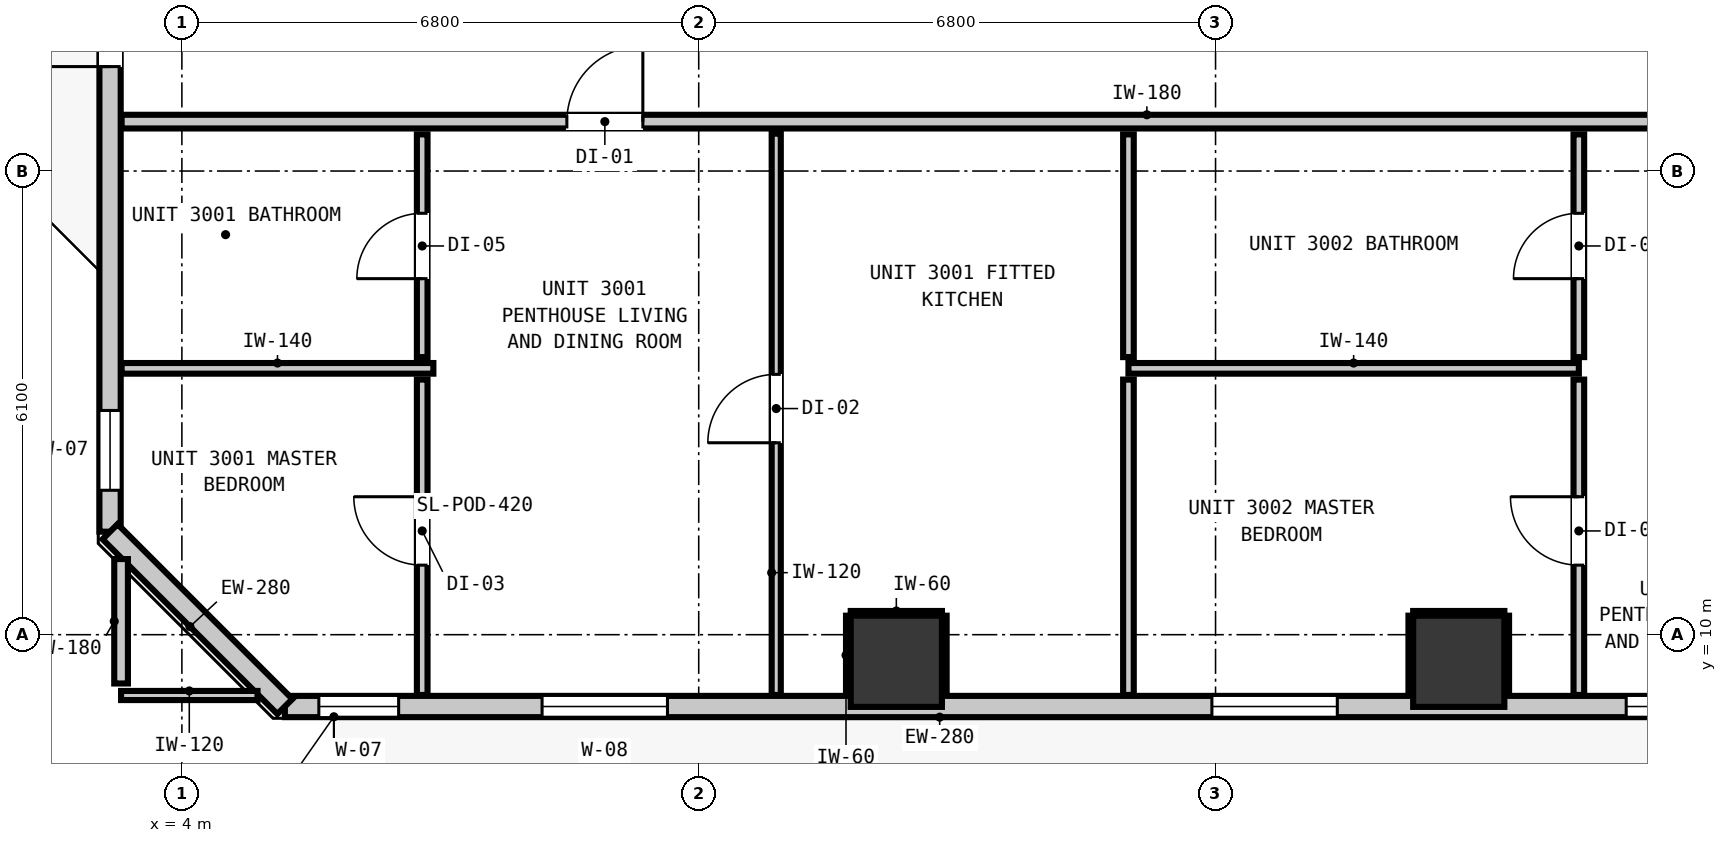
"""IFC4 building model, lengths in metres.
Left out: names, types, materials, properties, quantities, classifications, styles, units other than length and angle.
Written with IfcOpenShell. Run it as: python <this file> out.ifc"""

import sys

from ifc_helpers import new_model, si_unit, direction, frame, frame_2d, origin, origin_2d, place, context, subcontext, project, spatial, rectangle, extrude, element, fill, save


model = new_model("IFC4")
c1 = context("Model", 3, precision=1e-05, world=origin(), true_north=direction((0.0, 1.0)))
c2 = subcontext(c1, "Body", "Model", "MODEL_VIEW")
j1 = project(units=[si_unit("LENGTHUNIT", "METRE"), si_unit("PLANEANGLEUNIT", "RADIAN")], contexts=[c1])
p1 = place(None, origin())
s1 = spatial("IfcSite", under=j1, at=p1, CompositionType="ELEMENT")
p2 = place(p1, origin())
s2 = spatial("IfcBuilding", under=s1, at=p2, CompositionType="ELEMENT")
p3 = place(p2, frame((0.0, 0.0, 106.08)))
s3 = spatial("IfcBuildingStorey", under=s2, at=p3, CompositionType="ELEMENT", Elevation=106.08)
for number, where, z_axis, x_axis in (
    (1, (13.4, 9.65, -0.2), (0.0, 0.0, 1.0), (1.0, 0.0, 0.0)),
    (2, (20.8, 9.65, -0.2), (0.0, 0.0, 1.0), (1.0, 0.0, 0.0)),
):
    element("IfcColumn", number, at=place(p3, frame(where, z_axis=z_axis, x_axis=x_axis)), inside=s3, PredefinedType="COLUMN", context=c2, shape_type="SweptSolid", body=[
        extrude(rectangle(XDim=1.2, YDim=1.2, at=origin_2d()), origin(), (0.0, 0.0, 1.0), 3.52),
    ])
p4 = place(p3, frame((3.055, 11.355, 0.0), z_axis=(0.0, 0.0, 1.0), x_axis=(0.0, 1.0, 0.0)))
e3 = element("IfcWall", 3, at=p4, inside=s3, PredefinedType="STANDARD", context=c2, shape_type="SweptSolid", body=[
    extrude(rectangle(XDim=32.29, YDim=0.28, at=frame_2d((16.145, 0.0))), origin(), (0.0, 0.0, 1.0), 3.08),
])
p5 = place(p4, frame((6.119, 0.0, 0.0)))
e4 = element("IfcOpeningElement", 4, at=p5, cuts=e3, PredefinedType="OPENING", context=c2, shape_type="SweptSolid", body=[
    extrude(rectangle(XDim=1.1, YDim=2.15, at=frame_2d((0.55, 1.075))), frame((0.0, 0.15, 0.0), z_axis=(0.0, -1.0, 0.0), x_axis=(1.0, 0.0, 0.0)), (0.0, 0.0, 1.0), 0.3),
])
p6 = place(p4, frame((0.545, 0.0, 0.85)))
e5 = element("IfcOpeningElement", 5, at=p6, cuts=e3, PredefinedType="OPENING", context=c2, shape_type="SweptSolid", body=[
    extrude(rectangle(XDim=1.05, YDim=1.65, at=frame_2d((0.525, 0.825))), frame((0.0, 0.15, 0.0), z_axis=(0.0, -1.0, 0.0), x_axis=(1.0, 0.0, 0.0)), (0.0, 0.0, 1.0), 0.3),
])
p7 = place(p4, frame((13.649, 0.0, 0.85)))
e6 = element("IfcOpeningElement", 6, at=p7, cuts=e3, PredefinedType="OPENING", context=c2, shape_type="SweptSolid", body=[
    extrude(rectangle(XDim=1.65, YDim=1.75, at=frame_2d((0.825, 0.875))), frame((0.0, 0.15, 0.0), z_axis=(0.0, -1.0, 0.0), x_axis=(1.0, 0.0, 0.0)), (0.0, 0.0, 1.0), 0.3),
])
p8 = place(p4, frame((16.887, 0.0, 0.85)))
e7 = element("IfcOpeningElement", 7, at=p8, cuts=e3, PredefinedType="OPENING", context=c2, shape_type="SweptSolid", body=[
    extrude(rectangle(XDim=1.65, YDim=1.75, at=frame_2d((0.825, 0.875))), frame((0.0, 0.15, 0.0), z_axis=(0.0, -1.0, 0.0), x_axis=(1.0, 0.0, 0.0)), (0.0, 0.0, 1.0), 0.3),
])
p9 = place(p4, frame((23.2, 0.0, 0.85)))
e8 = element("IfcOpeningElement", 8, at=p9, cuts=e3, PredefinedType="OPENING", context=c2, shape_type="SweptSolid", body=[
    extrude(rectangle(XDim=1.65, YDim=1.75, at=frame_2d((0.825, 0.875))), frame((0.0, 0.15, 0.0), z_axis=(0.0, -1.0, 0.0), x_axis=(1.0, 0.0, 0.0)), (0.0, 0.0, 1.0), 0.3),
])
p10 = place(p4, frame((26.312, 0.0, 0.85)))
e9 = element("IfcOpeningElement", 9, at=p10, cuts=e3, PredefinedType="OPENING", context=c2, shape_type="SweptSolid", body=[
    extrude(rectangle(XDim=1.05, YDim=1.65, at=frame_2d((0.525, 0.825))), frame((0.0, 0.15, 0.0), z_axis=(0.0, -1.0, 0.0), x_axis=(1.0, 0.0, 0.0)), (0.0, 0.0, 1.0), 0.3),
])
p11 = place(p3, frame((40.445, 9.055, 0.0), z_axis=(0.0, 0.0, 1.0), x_axis=(-1.0, 0.0, 0.0)))
e10 = element("IfcWall", 10, at=p11, inside=s3, PredefinedType="STANDARD", context=c2, shape_type="SweptSolid", body=[
    extrude(rectangle(XDim=35.09, YDim=0.28, at=frame_2d((17.545, 0.0))), origin(), (0.0, 0.0, 1.0), 3.08),
])
p12 = place(p11, frame((5.114, 0.0, 0.0)))
e11 = element("IfcOpeningElement", 11, at=p12, cuts=e10, PredefinedType="OPENING", context=c2, shape_type="SweptSolid", body=[
    extrude(rectangle(XDim=1.0, YDim=2.15, at=frame_2d((0.5, 1.075))), frame((0.0, 0.15, 0.0), z_axis=(0.0, -1.0, 0.0), x_axis=(1.0, 0.0, 0.0)), (0.0, 0.0, 1.0), 0.3),
])
p13 = place(p11, frame((30.056, 0.0, 0.85)))
e12 = element("IfcOpeningElement", 12, at=p13, cuts=e10, PredefinedType="OPENING", context=c2, shape_type="SweptSolid", body=[
    extrude(rectangle(XDim=1.65, YDim=1.75, at=frame_2d((0.825, 0.875))), frame((0.0, 0.15, 0.0), z_axis=(0.0, -1.0, 0.0), x_axis=(1.0, 0.0, 0.0)), (0.0, 0.0, 1.0), 0.3),
])
p14 = place(p11, frame((33.593, 0.0, 0.85)))
e13 = element("IfcOpeningElement", 13, at=p14, cuts=e10, PredefinedType="OPENING", context=c2, shape_type="SweptSolid", body=[
    extrude(rectangle(XDim=1.05, YDim=1.65, at=frame_2d((0.525, 0.825))), frame((0.0, 0.15, 0.0), z_axis=(0.0, -1.0, 0.0), x_axis=(1.0, 0.0, 0.0)), (0.0, 0.0, 1.0), 0.3),
])
p15 = place(p11, frame((15.792, 0.0, 0.85)))
e14 = element("IfcOpeningElement", 14, at=p15, cuts=e10, PredefinedType="OPENING", context=c2, shape_type="SweptSolid", body=[
    extrude(rectangle(XDim=1.65, YDim=1.75, at=frame_2d((0.825, 0.875))), frame((0.0, 0.15, 0.0), z_axis=(0.0, -1.0, 0.0), x_axis=(1.0, 0.0, 0.0)), (0.0, 0.0, 1.0), 0.3),
])
p16 = place(p11, frame((21.243, 0.0, 0.85)))
e15 = element("IfcOpeningElement", 15, at=p16, cuts=e10, PredefinedType="OPENING", context=c2, shape_type="SweptSolid", body=[
    extrude(rectangle(XDim=1.65, YDim=1.75, at=frame_2d((0.825, 0.875))), frame((0.0, 0.15, 0.0), z_axis=(0.0, -1.0, 0.0), x_axis=(1.0, 0.0, 0.0)), (0.0, 0.0, 1.0), 0.3),
])
p17 = place(p11, frame((6.707, 0.0, 0.85)))
e16 = element("IfcOpeningElement", 16, at=p17, cuts=e10, PredefinedType="OPENING", context=c2, shape_type="SweptSolid", body=[
    extrude(rectangle(XDim=1.05, YDim=1.65, at=frame_2d((0.525, 0.825))), frame((0.0, 0.15, 0.0), z_axis=(0.0, -1.0, 0.0), x_axis=(1.0, 0.0, 0.0)), (0.0, 0.0, 1.0), 0.3),
])
p18 = place(p11, frame((8.673, 0.0, 0.85)))
e17 = element("IfcOpeningElement", 17, at=p18, cuts=e10, PredefinedType="OPENING", context=c2, shape_type="SweptSolid", body=[
    extrude(rectangle(XDim=1.65, YDim=1.75, at=frame_2d((0.825, 0.875))), frame((0.0, 0.15, 0.0), z_axis=(0.0, -1.0, 0.0), x_axis=(1.0, 0.0, 0.0)), (0.0, 0.0, 1.0), 0.3),
])
p19 = place(p3, frame((5.355, 9.055, 0.0), z_axis=(0.0, 0.0, 1.0), x_axis=(-0.707106781187, 0.707106781187, 0.0)))
e18 = element("IfcWall", 18, at=p19, inside=s3, PredefinedType="STANDARD", context=c2, shape_type="SweptSolid", body=[
    extrude(rectangle(XDim=3.253, YDim=0.28, at=frame_2d((1.626, 0.0))), origin(), (0.0, 0.0, 1.0), 3.08),
])
p20 = place(p3, frame((3.207, 16.75, 0.0), z_axis=(0.0, 0.0, 1.0), x_axis=(1.0, 0.0, 0.0)))
e19 = element("IfcWall", 19, at=p20, inside=s3, PredefinedType="PARTITIONING", context=c2, shape_type="SweptSolid", body=[
    extrude(rectangle(XDim=39.386, YDim=0.18, at=frame_2d((19.693, 0.0))), origin(), (0.0, 0.0, 1.0), 3.08),
])
p21 = place(p20, frame((5.858, 0.0, 0.0)))
e20 = element("IfcOpeningElement", 20, at=p21, cuts=e19, PredefinedType="OPENING", context=c2, shape_type="SweptSolid", body=[
    extrude(rectangle(XDim=1.0, YDim=2.15, at=frame_2d((0.5, 1.075))), frame((0.0, 0.1, 0.0), z_axis=(0.0, -1.0, 0.0), x_axis=(1.0, 0.0, 0.0)), (0.0, 0.0, 1.0), 0.2),
])
p22 = place(p20, frame((20.121, 0.0, 0.0)))
e21 = element("IfcOpeningElement", 21, at=p22, cuts=e19, PredefinedType="OPENING", context=c2, shape_type="SweptSolid", body=[
    extrude(rectangle(XDim=1.0, YDim=2.15, at=frame_2d((0.5, 1.075))), frame((0.0, 0.1, 0.0), z_axis=(0.0, -1.0, 0.0), x_axis=(1.0, 0.0, 0.0)), (0.0, 0.0, 1.0), 0.2),
])
p23 = place(p20, frame((31.654, 0.0, 0.0)))
e22 = element("IfcOpeningElement", 22, at=p23, cuts=e19, PredefinedType="OPENING", context=c2, shape_type="SweptSolid", body=[
    extrude(rectangle(XDim=1.0, YDim=2.15, at=frame_2d((0.5, 1.075))), frame((0.0, 0.1, 0.0), z_axis=(0.0, -1.0, 0.0), x_axis=(1.0, 0.0, 0.0)), (0.0, 0.0, 1.0), 0.2),
])
p24 = place(p3, frame((3.207, 13.504, 0.0), z_axis=(0.0, 0.0, 1.0), x_axis=(1.0, 0.0, 0.0)))
e23 = element("IfcWall", 23, at=p24, inside=s3, PredefinedType="PARTITIONING", context=c2, shape_type="SweptSolid", body=[
    extrude(rectangle(XDim=4.102, YDim=0.14, at=frame_2d((2.051, 0.0))), origin(), (0.0, 0.0, 1.0), 3.08),
])
p25 = place(p3, frame((16.454, 13.504, 0.0), z_axis=(0.0, 0.0, 1.0), x_axis=(1.0, 0.0, 0.0)))
e24 = element("IfcWall", 24, at=p25, inside=s3, PredefinedType="PARTITIONING", context=c2, shape_type="SweptSolid", body=[
    extrude(rectangle(XDim=5.926, YDim=0.14, at=frame_2d((2.963, 0.0))), origin(), (0.0, 0.0, 1.0), 3.08),
])
p26 = place(p3, frame((3.2, 9.2, 0.0), z_axis=(0.0, 0.0, 1.0), x_axis=(1.0, 0.0, 0.0)))
e25 = element("IfcWall", 25, at=p26, inside=s3, PredefinedType="PARTITIONING", context=c2, shape_type="SweptSolid", body=[
    extrude(rectangle(XDim=1.795, YDim=0.12, at=frame_2d((0.897, 0.0))), origin(), (0.0, 0.0, 1.0), 3.08),
])
p27 = place(p3, frame((3.2, 9.358, 0.0), z_axis=(0.0, 0.0, 1.0), x_axis=(0.0, 1.0, 0.0)))
e26 = element("IfcWall", 26, at=p27, inside=s3, PredefinedType="PARTITIONING", context=c2, shape_type="SweptSolid", body=[
    extrude(rectangle(XDim=1.637, YDim=0.18, at=frame_2d((0.819, 0.0))), origin(), (0.0, 0.0, 1.0), 3.08),
])
p28 = place(p3, frame((7.162, 9.207, 0.0), z_axis=(0.0, 0.0, 1.0), x_axis=(0.0, 1.0, 0.0)))
e27 = element("IfcWall", 27, at=p28, inside=s3, PredefinedType="PARTITIONING", context=c2, shape_type="SweptSolid", body=[
    extrude(rectangle(XDim=4.149, YDim=0.14, at=frame_2d((2.074, 0.0))), origin(), (0.0, 0.0, 1.0), 3.08),
])
p29 = place(p28, frame((1.708, 0.0, 0.0)))
e28 = element("IfcOpeningElement", 28, at=p29, cuts=e27, PredefinedType="OPENING", context=c2, shape_type="SweptSolid", body=[
    extrude(rectangle(XDim=0.9, YDim=2.1, at=frame_2d((0.45, 1.05))), frame((0.0, 0.08, 0.0), z_axis=(0.0, -1.0, 0.0), x_axis=(1.0, 0.0, 0.0)), (0.0, 0.0, 1.0), 0.16),
])
p30 = place(p3, frame((7.162, 13.652, 0.0), z_axis=(0.0, 0.0, 1.0), x_axis=(0.0, 1.0, 0.0)))
e29 = element("IfcWall", 29, at=p30, inside=s3, PredefinedType="PARTITIONING", context=c2, shape_type="SweptSolid", body=[
    extrude(rectangle(XDim=2.93, YDim=0.14, at=frame_2d((1.465, 0.0))), origin(), (0.0, 0.0, 1.0), 3.08),
])
p31 = place(p30, frame((1.032, 0.0, 0.0)))
e30 = element("IfcOpeningElement", 30, at=p31, cuts=e29, PredefinedType="OPENING", context=c2, shape_type="SweptSolid", body=[
    extrude(rectangle(XDim=0.86, YDim=2.02, at=frame_2d((0.43, 1.01))), frame((0.0, 0.08, 0.0), z_axis=(0.0, -1.0, 0.0), x_axis=(1.0, 0.0, 0.0)), (0.0, 0.0, 1.0), 0.16),
])
p32 = place(p3, frame((16.454, 9.207, 0.0), z_axis=(0.0, 0.0, 1.0), x_axis=(0.0, 1.0, 0.0)))
e31 = element("IfcWall", 31, at=p32, inside=s3, PredefinedType="PARTITIONING", context=c2, shape_type="SweptSolid", body=[
    extrude(rectangle(XDim=4.149, YDim=0.14, at=frame_2d((2.074, 0.0))), origin(), (0.0, 0.0, 1.0), 3.08),
])
p33 = place(p3, frame((16.454, 13.652, 0.0), z_axis=(0.0, 0.0, 1.0), x_axis=(0.0, 1.0, 0.0)))
e32 = element("IfcWall", 32, at=p33, inside=s3, PredefinedType="PARTITIONING", context=c2, shape_type="SweptSolid", body=[
    extrude(rectangle(XDim=2.93, YDim=0.14, at=frame_2d((1.465, 0.0))), origin(), (0.0, 0.0, 1.0), 3.08),
])
p34 = place(p3, frame((22.38, 9.207, 0.0), z_axis=(0.0, 0.0, 1.0), x_axis=(0.0, 1.0, 0.0)))
e33 = element("IfcWall", 33, at=p34, inside=s3, PredefinedType="PARTITIONING", context=c2, shape_type="SweptSolid", body=[
    extrude(rectangle(XDim=4.149, YDim=0.14, at=frame_2d((2.074, 0.0))), origin(), (0.0, 0.0, 1.0), 3.08),
])
p35 = place(p34, frame((1.708, 0.0, 0.0)))
e34 = element("IfcOpeningElement", 34, at=p35, cuts=e33, PredefinedType="OPENING", context=c2, shape_type="SweptSolid", body=[
    extrude(rectangle(XDim=0.9, YDim=2.1, at=frame_2d((0.45, 1.05))), frame((0.0, 0.08, 0.0), z_axis=(0.0, -1.0, 0.0), x_axis=(1.0, 0.0, 0.0)), (0.0, 0.0, 1.0), 0.16),
])
p36 = place(p3, frame((22.38, 13.652, 0.0), z_axis=(0.0, 0.0, 1.0), x_axis=(0.0, 1.0, 0.0)))
e35 = element("IfcWall", 35, at=p36, inside=s3, PredefinedType="PARTITIONING", context=c2, shape_type="SweptSolid", body=[
    extrude(rectangle(XDim=2.93, YDim=0.14, at=frame_2d((1.465, 0.0))), origin(), (0.0, 0.0, 1.0), 3.08),
])
p37 = place(p36, frame((1.032, 0.0, 0.0)))
e36 = element("IfcOpeningElement", 36, at=p37, cuts=e35, PredefinedType="OPENING", context=c2, shape_type="SweptSolid", body=[
    extrude(rectangle(XDim=0.86, YDim=2.02, at=frame_2d((0.43, 1.01))), frame((0.0, 0.08, 0.0), z_axis=(0.0, -1.0, 0.0), x_axis=(1.0, 0.0, 0.0)), (0.0, 0.0, 1.0), 0.16),
])
p38 = place(p3, frame((11.82, 9.207, 0.0), z_axis=(0.0, 0.0, 1.0), x_axis=(0.0, 1.0, 0.0)))
e37 = element("IfcWall", 37, at=p38, inside=s3, PredefinedType="PARTITIONING", context=c2, shape_type="SweptSolid", body=[
    extrude(rectangle(XDim=7.385, YDim=0.12, at=frame_2d((3.692, 0.0))), origin(), (0.0, 0.0, 1.0), 3.08),
])
p39 = place(p38, frame((3.318, 0.0, 0.0)))
e38 = element("IfcOpeningElement", 38, at=p39, cuts=e37, PredefinedType="OPENING", context=c2, shape_type="SweptSolid", body=[
    extrude(rectangle(XDim=0.9, YDim=2.1, at=frame_2d((0.45, 1.05))), frame((0.0, 0.07, 0.0), z_axis=(0.0, -1.0, 0.0), x_axis=(1.0, 0.0, 0.0)), (0.0, 0.0, 1.0), 0.14),
])
p40 = place(p3, frame((12.8, 10.282, 0.0), z_axis=(0.0, 0.0, 1.0), x_axis=(1.0, 0.0, 0.0)))
e39 = element("IfcWall", 39, at=p40, inside=s3, PredefinedType="PARTITIONING", context=c2, shape_type="SweptSolid", body=[
    extrude(rectangle(XDim=1.2, YDim=0.06, at=frame_2d((0.6, 0.0))), origin(), (0.0, 0.0, 1.0), 1.45),
])
for number, where, z_axis, x_axis in (
    (40, (12.768, 9.21, 0.0), (0.0, 0.0, 1.0), (0.0, 1.0, 0.0)),
    (41, (14.032, 9.21, 0.0), (0.0, 0.0, 1.0), (0.0, 1.0, 0.0)),
):
    element("IfcWall", number, at=place(p3, frame(where, z_axis=z_axis, x_axis=x_axis)), inside=s3, PredefinedType="PARTITIONING", context=c2, shape_type="SweptSolid", body=[
        extrude(rectangle(XDim=1.04, YDim=0.06, at=frame_2d((0.52, 0.0))), origin(), (0.0, 0.0, 1.0), 1.45),
    ])
p41 = place(p3, frame((20.2, 10.282, 0.0), z_axis=(0.0, 0.0, 1.0), x_axis=(1.0, 0.0, 0.0)))
e42 = element("IfcWall", 42, at=p41, inside=s3, PredefinedType="PARTITIONING", context=c2, shape_type="SweptSolid", body=[
    extrude(rectangle(XDim=1.2, YDim=0.06, at=frame_2d((0.6, 0.0))), origin(), (0.0, 0.0, 1.0), 1.45),
])
for number, where, z_axis, x_axis in (
    (43, (20.168, 9.21, 0.0), (0.0, 0.0, 1.0), (0.0, 1.0, 0.0)),
    (44, (21.432, 9.21, 0.0), (0.0, 0.0, 1.0), (0.0, 1.0, 0.0)),
):
    element("IfcWall", number, at=place(p3, frame(where, z_axis=z_axis, x_axis=x_axis)), inside=s3, PredefinedType="PARTITIONING", context=c2, shape_type="SweptSolid", body=[
        extrude(rectangle(XDim=1.04, YDim=0.06, at=frame_2d((0.52, 0.0))), origin(), (0.0, 0.0, 1.0), 1.45),
    ])
p42 = place(p5, origin())
e45 = element("IfcDoor", 45, at=p42, inside=s3, OperationType="SINGLE_SWING_LEFT", PredefinedType="DOOR", context=c2, shape_type="SweptSolid", body=[
    extrude(rectangle(XDim=1.1, YDim=2.15, at=frame_2d((0.55, 1.075))), frame((0.0, 0.025, 0.0), z_axis=(0.0, -1.0, 0.0), x_axis=(1.0, 0.0, 0.0)), (0.0, 0.0, 1.0), 0.05),
])
fill(e4, e45)
p43 = place(p6, origin())
e46 = element("IfcWindow", 46, at=p43, inside=s3, PartitioningType="SINGLE_PANEL", PredefinedType="WINDOW", context=c2, shape_type="SweptSolid", body=[
    extrude(rectangle(XDim=1.05, YDim=1.65, at=frame_2d((0.525, 0.825))), frame((0.0, 0.03, 0.0), z_axis=(0.0, -1.0, 0.0), x_axis=(1.0, 0.0, 0.0)), (0.0, 0.0, 1.0), 0.06),
])
fill(e5, e46)
p44 = place(p13, origin())
e47 = element("IfcWindow", 47, at=p44, inside=s3, PartitioningType="SINGLE_PANEL", PredefinedType="WINDOW", context=c2, shape_type="SweptSolid", body=[
    extrude(rectangle(XDim=1.65, YDim=1.75, at=frame_2d((0.825, 0.875))), frame((0.0, 0.03, 0.0), z_axis=(0.0, -1.0, 0.0), x_axis=(1.0, 0.0, 0.0)), (0.0, 0.0, 1.0), 0.06),
])
fill(e12, e47)
p45 = place(p14, origin())
e48 = element("IfcWindow", 48, at=p45, inside=s3, PartitioningType="SINGLE_PANEL", PredefinedType="WINDOW", context=c2, shape_type="SweptSolid", body=[
    extrude(rectangle(XDim=1.05, YDim=1.65, at=frame_2d((0.525, 0.825))), frame((0.0, 0.03, 0.0), z_axis=(0.0, -1.0, 0.0), x_axis=(1.0, 0.0, 0.0)), (0.0, 0.0, 1.0), 0.06),
])
fill(e13, e48)
p46 = place(p15, origin())
e49 = element("IfcWindow", 49, at=p46, inside=s3, PartitioningType="SINGLE_PANEL", PredefinedType="WINDOW", context=c2, shape_type="SweptSolid", body=[
    extrude(rectangle(XDim=1.65, YDim=1.75, at=frame_2d((0.825, 0.875))), frame((0.0, 0.03, 0.0), z_axis=(0.0, -1.0, 0.0), x_axis=(1.0, 0.0, 0.0)), (0.0, 0.0, 1.0), 0.06),
])
fill(e14, e49)
p47 = place(p16, origin())
e50 = element("IfcWindow", 50, at=p47, inside=s3, PartitioningType="SINGLE_PANEL", PredefinedType="WINDOW", context=c2, shape_type="SweptSolid", body=[
    extrude(rectangle(XDim=1.65, YDim=1.75, at=frame_2d((0.825, 0.875))), frame((0.0, 0.03, 0.0), z_axis=(0.0, -1.0, 0.0), x_axis=(1.0, 0.0, 0.0)), (0.0, 0.0, 1.0), 0.06),
])
fill(e15, e50)
p48 = place(p21, origin())
e51 = element("IfcDoor", 51, at=p48, inside=s3, OperationType="SINGLE_SWING_RIGHT", PredefinedType="DOOR", context=c2, shape_type="SweptSolid", body=[
    extrude(rectangle(XDim=1.0, YDim=2.15, at=frame_2d((0.5, 1.075))), frame((0.0, 0.025, 0.0), z_axis=(0.0, -1.0, 0.0), x_axis=(1.0, 0.0, 0.0)), (0.0, 0.0, 1.0), 0.05),
])
fill(e20, e51)
p49 = place(p31, origin())
e52 = element("IfcDoor", 52, at=p49, inside=s3, OperationType="SINGLE_SWING_LEFT", PredefinedType="DOOR", context=c2, shape_type="SweptSolid", body=[
    extrude(rectangle(XDim=0.86, YDim=2.02, at=frame_2d((0.43, 1.01))), frame((0.0, 0.025, 0.0), z_axis=(0.0, -1.0, 0.0), x_axis=(1.0, 0.0, 0.0)), (0.0, 0.0, 1.0), 0.05),
])
fill(e30, e52)
p50 = place(p29, origin())
e53 = element("IfcDoor", 53, at=p50, inside=s3, OperationType="SINGLE_SWING_RIGHT", PredefinedType="DOOR", context=c2, shape_type="SweptSolid", body=[
    extrude(rectangle(XDim=0.9, YDim=2.1, at=frame_2d((0.45, 1.05))), frame((0.0, 0.025, 0.0), z_axis=(0.0, -1.0, 0.0), x_axis=(1.0, 0.0, 0.0)), (0.0, 0.0, 1.0), 0.05),
])
fill(e28, e53)
p51 = place(p39, origin())
e54 = element("IfcDoor", 54, at=p51, inside=s3, OperationType="SINGLE_SWING_LEFT", PredefinedType="DOOR", context=c2, shape_type="SweptSolid", body=[
    extrude(rectangle(XDim=0.9, YDim=2.1, at=frame_2d((0.45, 1.05))), frame((0.0, 0.025, 0.0), z_axis=(0.0, -1.0, 0.0), x_axis=(1.0, 0.0, 0.0)), (0.0, 0.0, 1.0), 0.05),
])
fill(e38, e54)
p52 = place(p37, origin())
e55 = element("IfcDoor", 55, at=p52, inside=s3, OperationType="SINGLE_SWING_LEFT", PredefinedType="DOOR", context=c2, shape_type="SweptSolid", body=[
    extrude(rectangle(XDim=0.86, YDim=2.02, at=frame_2d((0.43, 1.01))), frame((0.0, 0.025, 0.0), z_axis=(0.0, -1.0, 0.0), x_axis=(1.0, 0.0, 0.0)), (0.0, 0.0, 1.0), 0.05),
])
fill(e36, e55)
p53 = place(p35, origin())
e56 = element("IfcDoor", 56, at=p53, inside=s3, OperationType="SINGLE_SWING_RIGHT", PredefinedType="DOOR", context=c2, shape_type="SweptSolid", body=[
    extrude(rectangle(XDim=0.9, YDim=2.1, at=frame_2d((0.45, 1.05))), frame((0.0, 0.025, 0.0), z_axis=(0.0, -1.0, 0.0), x_axis=(1.0, 0.0, 0.0)), (0.0, 0.0, 1.0), 0.05),
])
fill(e34, e56)
save(model, sys.argv[1])
